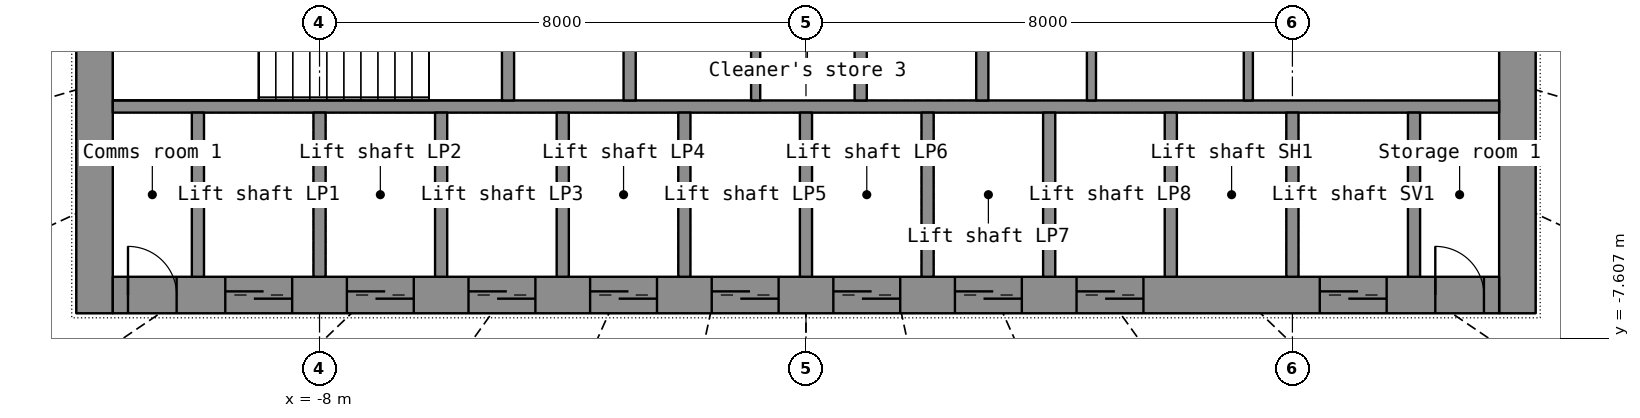
"""IFC4 building model, lengths in metres.
Left out: names, types, materials, properties, quantities, classifications, styles, units other than length and angle.
Written with IfcOpenShell. Run it as: python <this file> out.ifc"""

import sys

from ifc_helpers import new_model, si_unit, direction, frame, frame_2d, origin, place, context, subcontext, project, spatial, rectangle, extrude, element, fill, save


model = new_model("IFC4")
c1 = context("Model", 3, precision=1e-05, world=origin(), true_north=direction((0.0, 1.0)))
c2 = subcontext(c1, "Body", "Model", "MODEL_VIEW")
j1 = project(units=[si_unit("LENGTHUNIT", "METRE"), si_unit("PLANEANGLEUNIT", "RADIAN")], contexts=[c1])
p1 = place(None, origin())
s1 = spatial("IfcSite", under=j1, at=p1, CompositionType="ELEMENT")
p2 = place(p1, origin())
s2 = spatial("IfcBuilding", under=s1, at=p2, CompositionType="ELEMENT")
p3 = place(p2, frame((0.0, 0.0, 85.2)))
s3 = spatial("IfcBuildingStorey", under=s2, at=p3, CompositionType="ELEMENT", Elevation=85.2)
p4 = place(p3, frame((-11.7, -7.2, 0.0), z_axis=(0.0, 0.0, 1.0), x_axis=(0.0, 1.0, 0.0)))
e1 = element("IfcWall", 1, at=p4, inside=s3, PredefinedType="SHEAR", context=c2, shape_type="SweptSolid", body=[
    extrude(rectangle(XDim=14.4, YDim=0.6, at=frame_2d((7.2, 0.0))), origin(), (0.0, 0.0, 1.0), 7.0),
])
p5 = place(p4, frame((6.5, 0.0, 0.0)))
e2 = element("IfcOpeningElement", 2, at=p5, cuts=e1, PredefinedType="OPENING", context=c2, shape_type="SweptSolid", body=[
    extrude(rectangle(XDim=1.4, YDim=2.2, at=frame_2d((0.7, 1.1))), frame((0.0, 0.31, 0.0), z_axis=(0.0, -1.0, 0.0), x_axis=(1.0, 0.0, 0.0)), (0.0, 0.0, 1.0), 0.62),
])
p6 = place(p3, frame((11.7, -7.2, 0.0), z_axis=(0.0, 0.0, 1.0), x_axis=(0.0, 1.0, 0.0)))
e3 = element("IfcWall", 3, at=p6, inside=s3, PredefinedType="SHEAR", context=c2, shape_type="SweptSolid", body=[
    extrude(rectangle(XDim=14.4, YDim=0.6, at=frame_2d((7.2, 0.0))), origin(), (0.0, 0.0, 1.0), 7.0),
])
p7 = place(p6, frame((6.5, 0.0, 0.0)))
e4 = element("IfcOpeningElement", 4, at=p7, cuts=e3, PredefinedType="OPENING", context=c2, shape_type="SweptSolid", body=[
    extrude(rectangle(XDim=1.4, YDim=2.2, at=frame_2d((0.7, 1.1))), frame((0.0, 0.31, 0.0), z_axis=(0.0, -1.0, 0.0), x_axis=(1.0, 0.0, 0.0)), (0.0, 0.0, 1.0), 0.62),
])
p8 = place(p3, frame((-11.4, -6.9, 0.0), z_axis=(0.0, 0.0, 1.0), x_axis=(1.0, 0.0, 0.0)))
e5 = element("IfcWall", 5, at=p8, inside=s3, PredefinedType="SHEAR", context=c2, shape_type="SweptSolid", body=[
    extrude(rectangle(XDim=22.8, YDim=0.6, at=frame_2d((11.4, 0.0))), origin(), (0.0, 0.0, 1.0), 7.0),
])
p9 = place(p8, frame((1.85, 0.0, 0.0)))
e6 = element("IfcOpeningElement", 6, at=p9, cuts=e5, PredefinedType="OPENING", context=c2, shape_type="SweptSolid", body=[
    extrude(rectangle(XDim=1.1, YDim=2.2, at=frame_2d((0.55, 1.1))), frame((0.0, 0.31, 0.0), z_axis=(0.0, -1.0, 0.0), x_axis=(1.0, 0.0, 0.0)), (0.0, 0.0, 1.0), 0.62),
])
p10 = place(p8, frame((3.85, 0.0, 0.0)))
e7 = element("IfcOpeningElement", 7, at=p10, cuts=e5, PredefinedType="OPENING", context=c2, shape_type="SweptSolid", body=[
    extrude(rectangle(XDim=1.1, YDim=2.2, at=frame_2d((0.55, 1.1))), frame((0.0, 0.31, 0.0), z_axis=(0.0, -1.0, 0.0), x_axis=(1.0, 0.0, 0.0)), (0.0, 0.0, 1.0), 0.62),
])
p11 = place(p8, frame((5.85, 0.0, 0.0)))
e8 = element("IfcOpeningElement", 8, at=p11, cuts=e5, PredefinedType="OPENING", context=c2, shape_type="SweptSolid", body=[
    extrude(rectangle(XDim=1.1, YDim=2.2, at=frame_2d((0.55, 1.1))), frame((0.0, 0.31, 0.0), z_axis=(0.0, -1.0, 0.0), x_axis=(1.0, 0.0, 0.0)), (0.0, 0.0, 1.0), 0.62),
])
p12 = place(p8, frame((7.85, 0.0, 0.0)))
e9 = element("IfcOpeningElement", 9, at=p12, cuts=e5, PredefinedType="OPENING", context=c2, shape_type="SweptSolid", body=[
    extrude(rectangle(XDim=1.1, YDim=2.2, at=frame_2d((0.55, 1.1))), frame((0.0, 0.31, 0.0), z_axis=(0.0, -1.0, 0.0), x_axis=(1.0, 0.0, 0.0)), (0.0, 0.0, 1.0), 0.62),
])
p13 = place(p8, frame((9.85, 0.0, 0.0)))
e10 = element("IfcOpeningElement", 10, at=p13, cuts=e5, PredefinedType="OPENING", context=c2, shape_type="SweptSolid", body=[
    extrude(rectangle(XDim=1.1, YDim=2.2, at=frame_2d((0.55, 1.1))), frame((0.0, 0.31, 0.0), z_axis=(0.0, -1.0, 0.0), x_axis=(1.0, 0.0, 0.0)), (0.0, 0.0, 1.0), 0.62),
])
p14 = place(p8, frame((11.85, 0.0, 0.0)))
e11 = element("IfcOpeningElement", 11, at=p14, cuts=e5, PredefinedType="OPENING", context=c2, shape_type="SweptSolid", body=[
    extrude(rectangle(XDim=1.1, YDim=2.2, at=frame_2d((0.55, 1.1))), frame((0.0, 0.31, 0.0), z_axis=(0.0, -1.0, 0.0), x_axis=(1.0, 0.0, 0.0)), (0.0, 0.0, 1.0), 0.62),
])
p15 = place(p8, frame((13.85, 0.0, 0.0)))
e12 = element("IfcOpeningElement", 12, at=p15, cuts=e5, PredefinedType="OPENING", context=c2, shape_type="SweptSolid", body=[
    extrude(rectangle(XDim=1.1, YDim=2.2, at=frame_2d((0.55, 1.1))), frame((0.0, 0.31, 0.0), z_axis=(0.0, -1.0, 0.0), x_axis=(1.0, 0.0, 0.0)), (0.0, 0.0, 1.0), 0.62),
])
p16 = place(p8, frame((15.85, 0.0, 0.0)))
e13 = element("IfcOpeningElement", 13, at=p16, cuts=e5, PredefinedType="OPENING", context=c2, shape_type="SweptSolid", body=[
    extrude(rectangle(XDim=1.1, YDim=2.2, at=frame_2d((0.55, 1.1))), frame((0.0, 0.31, 0.0), z_axis=(0.0, -1.0, 0.0), x_axis=(1.0, 0.0, 0.0)), (0.0, 0.0, 1.0), 0.62),
])
p17 = place(p8, frame((19.85, 0.0, 0.0)))
e14 = element("IfcOpeningElement", 14, at=p17, cuts=e5, PredefinedType="OPENING", context=c2, shape_type="SweptSolid", body=[
    extrude(rectangle(XDim=1.1, YDim=2.2, at=frame_2d((0.55, 1.1))), frame((0.0, 0.31, 0.0), z_axis=(0.0, -1.0, 0.0), x_axis=(1.0, 0.0, 0.0)), (0.0, 0.0, 1.0), 0.62),
])
p18 = place(p8, frame((0.25, 0.0, 0.0)))
e15 = element("IfcOpeningElement", 15, at=p18, cuts=e5, PredefinedType="OPENING", context=c2, shape_type="SweptSolid", body=[
    extrude(rectangle(XDim=0.8, YDim=2.05, at=frame_2d((0.4, 1.025))), frame((0.0, 0.31, 0.0), z_axis=(0.0, -1.0, 0.0), x_axis=(1.0, 0.0, 0.0)), (0.0, 0.0, 1.0), 0.62),
])
p19 = place(p8, frame((21.75, 0.0, 0.0)))
e16 = element("IfcOpeningElement", 16, at=p19, cuts=e5, PredefinedType="OPENING", context=c2, shape_type="SweptSolid", body=[
    extrude(rectangle(XDim=0.8, YDim=2.05, at=frame_2d((0.4, 1.025))), frame((0.0, 0.31, 0.0), z_axis=(0.0, -1.0, 0.0), x_axis=(1.0, 0.0, 0.0)), (0.0, 0.0, 1.0), 0.62),
])
p20 = place(p3, frame((-11.4, -3.8, 0.0), z_axis=(0.0, 0.0, 1.0), x_axis=(1.0, 0.0, 0.0)))
e17 = element("IfcWall", 17, at=p20, inside=s3, PredefinedType="SHEAR", context=c2, shape_type="SweptSolid", body=[
    extrude(rectangle(XDim=22.8, YDim=0.2, at=frame_2d((11.4, 0.0))), origin(), (0.0, 0.0, 1.0), 7.0),
])
for number, where, z_axis, x_axis in (
    (18, (-10.0, -6.6, 0.0), (0.0, 0.0, 1.0), (0.0, 1.0, 0.0)),
    (19, (-8.0, -6.6, 0.0), (0.0, 0.0, 1.0), (0.0, 1.0, 0.0)),
    (20, (-6.0, -6.6, 0.0), (0.0, 0.0, 1.0), (0.0, 1.0, 0.0)),
    (21, (-4.0, -6.6, 0.0), (0.0, 0.0, 1.0), (0.0, 1.0, 0.0)),
    (22, (-2.0, -6.6, 0.0), (0.0, 0.0, 1.0), (0.0, 1.0, 0.0)),
    (23, (0.0, -6.6, 0.0), (0.0, 0.0, 1.0), (0.0, 1.0, 0.0)),
    (24, (2.0, -6.6, 0.0), (0.0, 0.0, 1.0), (0.0, 1.0, 0.0)),
    (25, (4.0, -6.6, 0.0), (0.0, 0.0, 1.0), (0.0, 1.0, 0.0)),
    (26, (6.0, -6.6, 0.0), (0.0, 0.0, 1.0), (0.0, 1.0, 0.0)),
    (27, (8.0, -6.6, 0.0), (0.0, 0.0, 1.0), (0.0, 1.0, 0.0)),
    (28, (10.0, -6.6, 0.0), (0.0, 0.0, 1.0), (0.0, 1.0, 0.0)),
):
    element("IfcWall", number, at=place(p3, frame(where, z_axis=z_axis, x_axis=x_axis)), inside=s3, PredefinedType="SHEAR", context=c2, shape_type="SweptSolid", body=[
        extrude(rectangle(XDim=2.7, YDim=0.2, at=frame_2d((1.35, 0.0))), origin(), (0.0, 0.0, 1.0), 7.0),
    ])
p21 = place(p3, frame((-2.9, -3.7, 0.0), z_axis=(0.0, 0.0, 1.0), x_axis=(0.0, 1.0, 0.0)))
e29 = element("IfcWall", 29, at=p21, inside=s3, PredefinedType="SHEAR", context=c2, shape_type="SweptSolid", body=[
    extrude(rectangle(XDim=7.4, YDim=0.2, at=frame_2d((3.7, 0.0))), origin(), (0.0, 0.0, 1.0), 7.0),
])
p22 = place(p21, frame((3.1, 0.0, 0.0)))
e30 = element("IfcOpeningElement", 30, at=p22, cuts=e29, PredefinedType="OPENING", context=c2, shape_type="SweptSolid", body=[
    extrude(rectangle(XDim=1.2, YDim=2.2, at=frame_2d((0.6, 1.1))), frame((0.0, 0.11, 0.0), z_axis=(0.0, -1.0, 0.0), x_axis=(1.0, 0.0, 0.0)), (0.0, 0.0, 1.0), 0.22),
])
p23 = place(p3, frame((2.9, -3.7, 0.0), z_axis=(0.0, 0.0, 1.0), x_axis=(0.0, 1.0, 0.0)))
e31 = element("IfcWall", 31, at=p23, inside=s3, PredefinedType="SHEAR", context=c2, shape_type="SweptSolid", body=[
    extrude(rectangle(XDim=7.4, YDim=0.2, at=frame_2d((3.7, 0.0))), origin(), (0.0, 0.0, 1.0), 7.0),
])
p24 = place(p23, frame((3.1, 0.0, 0.0)))
e32 = element("IfcOpeningElement", 32, at=p24, cuts=e31, PredefinedType="OPENING", context=c2, shape_type="SweptSolid", body=[
    extrude(rectangle(XDim=1.2, YDim=2.2, at=frame_2d((0.6, 1.1))), frame((0.0, 0.11, 0.0), z_axis=(0.0, -1.0, 0.0), x_axis=(1.0, 0.0, 0.0)), (0.0, 0.0, 1.0), 0.22),
])
for number, where, z_axis, x_axis in (
    (33, (0.9, -3.7, 0.0), (0.0, 0.0, 1.0), (0.0, 1.0, 0.0)),
    (34, (-4.9, -3.7, 0.0), (0.0, 0.0, 1.0), (0.0, 1.0, 0.0)),
):
    element("IfcWall", number, at=place(p3, frame(where, z_axis=z_axis, x_axis=x_axis)), inside=s3, PredefinedType="SHEAR", context=c2, shape_type="SweptSolid", body=[
        extrude(rectangle(XDim=2.35, YDim=0.2, at=frame_2d((1.175, 0.0))), origin(), (0.0, 0.0, 1.0), 7.0),
    ])
for number, where, z_axis, x_axis in (
    (35, (4.695, -3.7, 0.0), (0.0, 0.0, 1.0), (0.0, 1.0, 0.0)),
    (36, (7.275, -3.7, 0.0), (0.0, 0.0, 1.0), (0.0, 1.0, 0.0)),
    (37, (-0.827, -3.7, 0.0), (0.0, 0.0, 1.0), (0.0, 1.0, 0.0)),
):
    element("IfcWall", number, at=place(p3, frame(where, z_axis=z_axis, x_axis=x_axis)), inside=s3, PredefinedType="PARTITIONING", context=c2, shape_type="SweptSolid", body=[
        extrude(rectangle(XDim=2.35, YDim=0.15, at=frame_2d((1.175, 0.0))), origin(), (0.0, 0.0, 1.0), 7.0),
    ])
p25 = place(p9, origin())
e38 = element("IfcDoor", 38, at=p25, inside=s3, OperationType="DOUBLE_DOOR_SLIDING", PredefinedType="DOOR", context=c2, shape_type="SweptSolid", body=[
    extrude(rectangle(XDim=1.1, YDim=2.2, at=frame_2d((0.55, 1.1))), frame((0.0, 0.025, 0.0), z_axis=(0.0, -1.0, 0.0), x_axis=(1.0, 0.0, 0.0)), (0.0, 0.0, 1.0), 0.05),
])
fill(e6, e38)
p26 = place(p10, origin())
e39 = element("IfcDoor", 39, at=p26, inside=s3, OperationType="DOUBLE_DOOR_SLIDING", PredefinedType="DOOR", context=c2, shape_type="SweptSolid", body=[
    extrude(rectangle(XDim=1.1, YDim=2.2, at=frame_2d((0.55, 1.1))), frame((0.0, 0.025, 0.0), z_axis=(0.0, -1.0, 0.0), x_axis=(1.0, 0.0, 0.0)), (0.0, 0.0, 1.0), 0.05),
])
fill(e7, e39)
p27 = place(p11, origin())
e40 = element("IfcDoor", 40, at=p27, inside=s3, OperationType="DOUBLE_DOOR_SLIDING", PredefinedType="DOOR", context=c2, shape_type="SweptSolid", body=[
    extrude(rectangle(XDim=1.1, YDim=2.2, at=frame_2d((0.55, 1.1))), frame((0.0, 0.025, 0.0), z_axis=(0.0, -1.0, 0.0), x_axis=(1.0, 0.0, 0.0)), (0.0, 0.0, 1.0), 0.05),
])
fill(e8, e40)
p28 = place(p12, origin())
e41 = element("IfcDoor", 41, at=p28, inside=s3, OperationType="DOUBLE_DOOR_SLIDING", PredefinedType="DOOR", context=c2, shape_type="SweptSolid", body=[
    extrude(rectangle(XDim=1.1, YDim=2.2, at=frame_2d((0.55, 1.1))), frame((0.0, 0.025, 0.0), z_axis=(0.0, -1.0, 0.0), x_axis=(1.0, 0.0, 0.0)), (0.0, 0.0, 1.0), 0.05),
])
fill(e9, e41)
p29 = place(p13, origin())
e42 = element("IfcDoor", 42, at=p29, inside=s3, OperationType="DOUBLE_DOOR_SLIDING", PredefinedType="DOOR", context=c2, shape_type="SweptSolid", body=[
    extrude(rectangle(XDim=1.1, YDim=2.2, at=frame_2d((0.55, 1.1))), frame((0.0, 0.025, 0.0), z_axis=(0.0, -1.0, 0.0), x_axis=(1.0, 0.0, 0.0)), (0.0, 0.0, 1.0), 0.05),
])
fill(e10, e42)
p30 = place(p14, origin())
e43 = element("IfcDoor", 43, at=p30, inside=s3, OperationType="DOUBLE_DOOR_SLIDING", PredefinedType="DOOR", context=c2, shape_type="SweptSolid", body=[
    extrude(rectangle(XDim=1.1, YDim=2.2, at=frame_2d((0.55, 1.1))), frame((0.0, 0.025, 0.0), z_axis=(0.0, -1.0, 0.0), x_axis=(1.0, 0.0, 0.0)), (0.0, 0.0, 1.0), 0.05),
])
fill(e11, e43)
p31 = place(p15, origin())
e44 = element("IfcDoor", 44, at=p31, inside=s3, OperationType="DOUBLE_DOOR_SLIDING", PredefinedType="DOOR", context=c2, shape_type="SweptSolid", body=[
    extrude(rectangle(XDim=1.1, YDim=2.2, at=frame_2d((0.55, 1.1))), frame((0.0, 0.025, 0.0), z_axis=(0.0, -1.0, 0.0), x_axis=(1.0, 0.0, 0.0)), (0.0, 0.0, 1.0), 0.05),
])
fill(e12, e44)
p32 = place(p16, origin())
e45 = element("IfcDoor", 45, at=p32, inside=s3, OperationType="DOUBLE_DOOR_SLIDING", PredefinedType="DOOR", context=c2, shape_type="SweptSolid", body=[
    extrude(rectangle(XDim=1.1, YDim=2.2, at=frame_2d((0.55, 1.1))), frame((0.0, 0.025, 0.0), z_axis=(0.0, -1.0, 0.0), x_axis=(1.0, 0.0, 0.0)), (0.0, 0.0, 1.0), 0.05),
])
fill(e13, e45)
p33 = place(p17, origin())
e46 = element("IfcDoor", 46, at=p33, inside=s3, OperationType="DOUBLE_DOOR_SLIDING", PredefinedType="DOOR", context=c2, shape_type="SweptSolid", body=[
    extrude(rectangle(XDim=1.1, YDim=2.2, at=frame_2d((0.55, 1.1))), frame((0.0, 0.025, 0.0), z_axis=(0.0, -1.0, 0.0), x_axis=(1.0, 0.0, 0.0)), (0.0, 0.0, 1.0), 0.05),
])
fill(e14, e46)
p34 = place(p18, origin())
e47 = element("IfcDoor", 47, at=p34, inside=s3, OperationType="SINGLE_SWING_LEFT", PredefinedType="DOOR", context=c2, shape_type="SweptSolid", body=[
    extrude(rectangle(XDim=0.8, YDim=2.05, at=frame_2d((0.4, 1.025))), frame((0.0, 0.025, 0.0), z_axis=(0.0, -1.0, 0.0), x_axis=(1.0, 0.0, 0.0)), (0.0, 0.0, 1.0), 0.05),
])
fill(e15, e47)
p35 = place(p19, origin())
e48 = element("IfcDoor", 48, at=p35, inside=s3, OperationType="SINGLE_SWING_LEFT", PredefinedType="DOOR", context=c2, shape_type="SweptSolid", body=[
    extrude(rectangle(XDim=0.8, YDim=2.05, at=frame_2d((0.4, 1.025))), frame((0.0, 0.025, 0.0), z_axis=(0.0, -1.0, 0.0), x_axis=(1.0, 0.0, 0.0)), (0.0, 0.0, 1.0), 0.05),
])
fill(e16, e48)
save(model, sys.argv[1])
